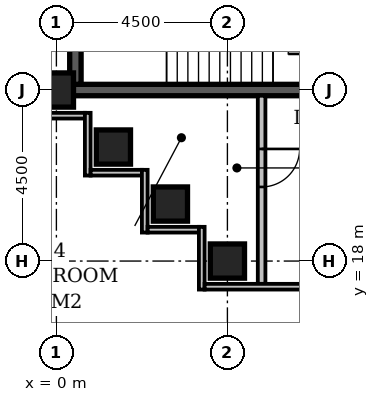
"""IFC4 building model, lengths in metres.
Left out: names, types, materials, properties, quantities, classifications, styles, units other than length and angle.
Written with IfcOpenShell. Run it as: python <this file> out.ifc"""

import sys

from ifc_helpers import new_model, si_unit, direction, frame, frame_2d, origin, origin_2d, place, context, subcontext, project, spatial, rectangle, extrude, element, fill, save


model = new_model("IFC4")
c1 = context("Model", 3, precision=1e-05, world=origin(), true_north=direction((0.0, 1.0)))
c2 = subcontext(c1, "Body", "Model", "MODEL_VIEW")
j1 = project(units=[si_unit("LENGTHUNIT", "METRE"), si_unit("PLANEANGLEUNIT", "RADIAN")], contexts=[c1])
p1 = place(None, origin())
s1 = spatial("IfcSite", under=j1, at=p1, CompositionType="ELEMENT")
p2 = place(p1, origin())
s2 = spatial("IfcBuilding", under=s1, at=p2, CompositionType="ELEMENT")
p3 = place(p2, frame((0.0, 0.0, 247.4)))
s3 = spatial("IfcBuildingStorey", under=s2, at=p3, CompositionType="ELEMENT", Elevation=247.4)
p4 = place(p3, frame((0.35, 22.5, -0.3), z_axis=(0.0, 0.0, 1.0), x_axis=(1.0, 0.0, 0.0)))
e1 = element("IfcWall", 1, at=p4, inside=s3, PredefinedType="SHEAR", context=c2, shape_type="SweptSolid", body=[
    extrude(rectangle(XDim=7.0, YDim=0.3, at=frame_2d((3.5, 0.0))), origin(), (0.0, 0.0, 1.0), 3.6),
])
p5 = place(p3, frame((0.5, 22.65, -0.3), z_axis=(0.0, 0.0, 1.0), x_axis=(0.0, 1.0, 0.0)))
e2 = element("IfcWall", 2, at=p5, inside=s3, PredefinedType="SHEAR", context=c2, shape_type="SweptSolid", body=[
    extrude(rectangle(XDim=4.2, YDim=0.3, at=frame_2d((2.1, 0.0))), origin(), (0.0, 0.0, 1.0), 3.6),
])
for number, where, z_axis, x_axis in (
    (3, (4.5, 18.0, -0.3), (0.0, 0.0, 1.0), (1.0, 0.0, 0.0)),
    (4, (3.0, 19.5, -0.3), (0.0, 0.0, 1.0), (1.0, 0.0, 0.0)),
    (5, (1.5, 21.0, -0.3), (0.0, 0.0, 1.0), (1.0, 0.0, 0.0)),
    (6, (0.0, 22.5, -0.3), (0.0, 0.0, 1.0), (1.0, 0.0, 0.0)),
):
    element("IfcColumn", number, at=place(p3, frame(where, z_axis=z_axis, x_axis=x_axis)), inside=s3, PredefinedType="COLUMN", context=c2, shape_type="SweptSolid", body=[
        extrude(rectangle(XDim=0.9, YDim=0.9, at=origin_2d()), origin(), (0.0, 0.0, 1.0), 3.6),
    ])
p6 = place(p3, frame((-0.6, 21.825, 0.0), z_axis=(0.0, 0.0, 1.0), x_axis=(1.0, 0.0, 0.0)))
e7 = element("IfcWall", 7, at=p6, inside=s3, PredefinedType="STANDARD", context=c2, shape_type="SweptSolid", body=[
    extrude(rectangle(XDim=1.35, YDim=0.15, at=frame_2d((0.675, 0.0))), origin(), (0.0, 0.0, 1.0), 2.7),
])
p7 = place(p3, frame((0.825, 21.9, 0.0), z_axis=(0.0, 0.0, 1.0), x_axis=(0.0, -1.0, 0.0)))
e8 = element("IfcWall", 8, at=p7, inside=s3, PredefinedType="STANDARD", context=c2, shape_type="SweptSolid", body=[
    extrude(rectangle(XDim=1.65, YDim=0.15, at=frame_2d((0.825, 0.0))), origin(), (0.0, 0.0, 1.0), 2.7),
])
p8 = place(p3, frame((0.9, 20.325, 0.0), z_axis=(0.0, 0.0, 1.0), x_axis=(1.0, 0.0, 0.0)))
e9 = element("IfcWall", 9, at=p8, inside=s3, PredefinedType="STANDARD", context=c2, shape_type="SweptSolid", body=[
    extrude(rectangle(XDim=1.35, YDim=0.15, at=frame_2d((0.675, 0.0))), origin(), (0.0, 0.0, 1.0), 2.7),
])
p9 = place(p3, frame((2.325, 20.4, 0.0), z_axis=(0.0, 0.0, 1.0), x_axis=(0.0, -1.0, 0.0)))
e10 = element("IfcWall", 10, at=p9, inside=s3, PredefinedType="STANDARD", context=c2, shape_type="SweptSolid", body=[
    extrude(rectangle(XDim=1.65, YDim=0.15, at=frame_2d((0.825, 0.0))), origin(), (0.0, 0.0, 1.0), 2.7),
])
p10 = place(p3, frame((2.4, 18.825, 0.0), z_axis=(0.0, 0.0, 1.0), x_axis=(1.0, 0.0, 0.0)))
e11 = element("IfcWall", 11, at=p10, inside=s3, PredefinedType="STANDARD", context=c2, shape_type="SweptSolid", body=[
    extrude(rectangle(XDim=1.35, YDim=0.15, at=frame_2d((0.675, 0.0))), origin(), (0.0, 0.0, 1.0), 2.7),
])
p11 = place(p3, frame((3.825, 18.9, 0.0), z_axis=(0.0, 0.0, 1.0), x_axis=(0.0, -1.0, 0.0)))
e12 = element("IfcWall", 12, at=p11, inside=s3, PredefinedType="STANDARD", context=c2, shape_type="SweptSolid", body=[
    extrude(rectangle(XDim=1.65, YDim=0.15, at=frame_2d((0.825, 0.0))), origin(), (0.0, 0.0, 1.0), 2.7),
])
p12 = place(p3, frame((3.9, 17.325, 0.0), z_axis=(0.0, 0.0, 1.0), x_axis=(1.0, 0.0, 0.0)))
e13 = element("IfcWall", 13, at=p12, inside=s3, PredefinedType="STANDARD", context=c2, shape_type="SweptSolid", body=[
    extrude(rectangle(XDim=19.35, YDim=0.15, at=frame_2d((9.675, 0.0))), origin(), (0.0, 0.0, 1.0), 2.7),
])
p13 = place(p12, frame((10.65, 0.0, 0.6)))
e14 = element("IfcOpeningElement", 14, at=p13, cuts=e13, PredefinedType="OPENING", context=c2, shape_type="SweptSolid", body=[
    extrude(rectangle(XDim=2.4, YDim=1.8, at=frame_2d((1.2, 0.9))), frame((0.0, 0.087, 0.0), z_axis=(0.0, -1.0, 0.0), x_axis=(1.0, 0.0, 0.0)), (0.0, 0.0, 1.0), 0.174),
])
p14 = place(p12, frame((15.15, 0.0, 0.6)))
e15 = element("IfcOpeningElement", 15, at=p14, cuts=e13, PredefinedType="OPENING", context=c2, shape_type="SweptSolid", body=[
    extrude(rectangle(XDim=2.4, YDim=1.8, at=frame_2d((1.2, 0.9))), frame((0.0, 0.087, 0.0), z_axis=(0.0, -1.0, 0.0), x_axis=(1.0, 0.0, 0.0)), (0.0, 0.0, 1.0), 0.174),
])
p15 = place(p3, frame((5.4, 17.4, 0.0), z_axis=(0.0, 0.0, 1.0), x_axis=(0.0, 1.0, 0.0)))
e16 = element("IfcWall", 16, at=p15, inside=s3, PredefinedType="PARTITIONING", context=c2, shape_type="SweptSolid", body=[
    extrude(rectangle(XDim=4.95, YDim=0.2, at=frame_2d((2.475, 0.0))), origin(), (0.0, 0.0, 1.0), 3.3),
])
p16 = place(p15, frame((2.55, 0.0, 0.0)))
e17 = element("IfcOpeningElement", 17, at=p16, cuts=e16, PredefinedType="OPENING", context=c2, shape_type="SweptSolid", body=[
    extrude(rectangle(XDim=1.0, YDim=2.1, at=frame_2d((0.5, 1.05))), frame((0.0, 0.112, 0.0), z_axis=(0.0, -1.0, 0.0), x_axis=(1.0, 0.0, 0.0)), (0.0, 0.0, 1.0), 0.224),
])
p17 = place(p16, origin())
e18 = element("IfcDoor", 18, at=p17, inside=s3, OperationType="SINGLE_SWING_RIGHT", PredefinedType="DOOR", context=c2, shape_type="SweptSolid", body=[
    extrude(rectangle(XDim=1.0, YDim=2.1, at=frame_2d((0.5, 1.05))), frame((0.0, 0.025, 0.0), z_axis=(0.0, -1.0, 0.0), x_axis=(1.0, 0.0, 0.0)), (0.0, 0.0, 1.0), 0.05),
])
fill(e17, e18)
save(model, sys.argv[1])
